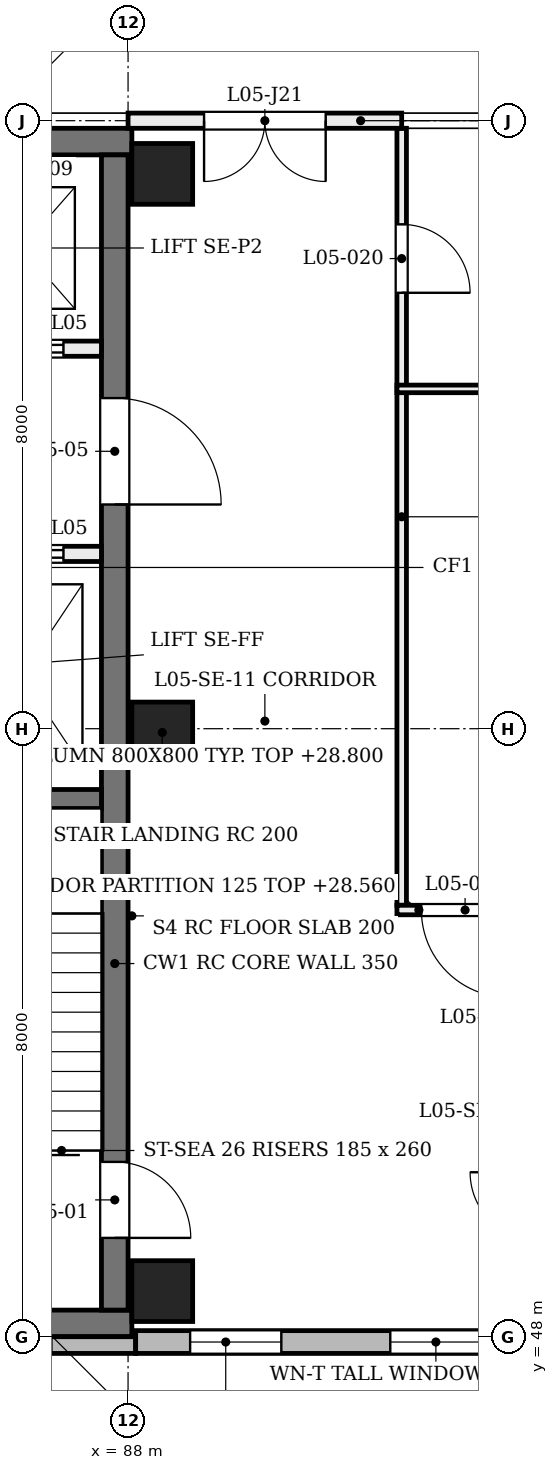
"""IFC4 building model, lengths in metres.
Left out: names, types, materials, properties, quantities, classifications, styles, units other than length and angle.
Written with IfcOpenShell. Run it as: python <this file> out.ifc"""

import sys

from ifc_helpers import new_model, si_unit, direction, frame, frame_2d, origin, origin_2d, place, context, subcontext, project, spatial, rectangle, extrude, element, fill, save


model = new_model("IFC4")
c1 = context("Model", 3, precision=1e-05, world=origin(), true_north=direction((0.0, 1.0)))
c2 = subcontext(c1, "Body", "Model", "MODEL_VIEW")
j1 = project(units=[si_unit("LENGTHUNIT", "METRE"), si_unit("PLANEANGLEUNIT", "RADIAN")], contexts=[c1])
p1 = place(None, origin())
s1 = spatial("IfcSite", under=j1, at=p1, CompositionType="ELEMENT")
p2 = place(p1, origin())
s2 = spatial("IfcBuilding", under=s1, at=p2, CompositionType="ELEMENT")
p3 = place(p2, frame((0.0, 0.0, 24.0)))
s3 = spatial("IfcBuildingStorey", under=s2, at=p3, CompositionType="ELEMENT", Elevation=24.0)
for number, where, z_axis, x_axis in (
    (1, (80.1, 48.175, 0.0), (0.0, 0.0, 1.0), (1.0, 0.0, 0.0)),
    (2, (80.1, 63.725, 0.0), (0.0, 0.0, 1.0), (1.0, 0.0, 0.0)),
):
    element("IfcWall", number, at=place(p3, frame(where, z_axis=z_axis, x_axis=x_axis)), inside=s3, PredefinedType="SHEAR", context=c2, shape_type="SweptSolid", body=[
        extrude(rectangle(XDim=7.95, YDim=0.35, at=frame_2d((3.975, 0.0))), origin(), (0.0, 0.0, 1.0), 4.58),
    ])
p4 = place(p3, frame((87.825, 48.35, 0.0), z_axis=(0.0, 0.0, 1.0), x_axis=(0.0, 1.0, 0.0)))
e3 = element("IfcWall", 3, at=p4, inside=s3, PredefinedType="SHEAR", context=c2, shape_type="SweptSolid", body=[
    extrude(rectangle(XDim=15.2, YDim=0.35, at=frame_2d((7.6, 0.0))), origin(), (0.0, 0.0, 1.0), 4.58),
])
p5 = place(p4, frame((0.95, 0.0, 0.0)))
e4 = element("IfcOpeningElement", 4, at=p5, cuts=e3, PredefinedType="OPENING", context=c2, shape_type="SweptSolid", body=[
    extrude(rectangle(XDim=1.0, YDim=2.1, at=frame_2d((0.5, 1.05))), frame((0.0, 0.185, 0.0), z_axis=(0.0, -1.0, 0.0), x_axis=(1.0, 0.0, 0.0)), (0.0, 0.0, 1.0), 0.37),
])
p6 = place(p4, frame((10.6, 0.0, 0.0)))
e5 = element("IfcOpeningElement", 5, at=p6, cuts=e3, PredefinedType="OPENING", context=c2, shape_type="SweptSolid", body=[
    extrude(rectangle(XDim=1.4, YDim=2.1, at=frame_2d((0.7, 1.05))), frame((0.0, 0.185, 0.0), z_axis=(0.0, -1.0, 0.0), x_axis=(1.0, 0.0, 0.0)), (0.0, 0.0, 1.0), 0.37),
])
for number, where, z_axis, x_axis in (
    (6, (88.45, 48.6, 0.0), (0.0, 0.0, 1.0), (1.0, 0.0, 0.0)),
    (7, (88.45, 55.95, 0.0), (0.0, 0.0, 1.0), (1.0, 0.0, 0.0)),
    (8, (88.45, 63.3, 0.0), (0.0, 0.0, 1.0), (1.0, 0.0, 0.0)),
):
    element("IfcColumn", number, at=place(p3, frame(where, z_axis=z_axis, x_axis=x_axis)), inside=s3, PredefinedType="COLUMN", context=c2, shape_type="SweptSolid", body=[
        extrude(rectangle(XDim=0.8, YDim=0.8, at=origin_2d()), origin(), (0.0, 0.0, 1.0), 4.8),
    ])
p7 = place(p3, frame((79.9, 47.89, 0.0), z_axis=(0.0, 0.0, 1.0), x_axis=(1.0, 0.0, 0.0)))
e9 = element("IfcWall", 9, at=p7, inside=s3, PredefinedType="SOLIDWALL", context=c2, shape_type="SweptSolid", body=[
    extrude(rectangle(XDim=8.2, YDim=0.22, at=frame_2d((4.1, 0.0))), origin(), (0.0, 0.0, 1.0), 3.9),
])
p8 = place(p7, frame((1.308, 0.0, 0.9)))
e10 = element("IfcOpeningElement", 10, at=p8, cuts=e9, PredefinedType="OPENING", context=c2, shape_type="SweptSolid", body=[
    extrude(rectangle(XDim=0.45, YDim=2.6, at=frame_2d((0.225, 1.3))), frame((0.0, 0.12, 0.0), z_axis=(0.0, -1.0, 0.0), x_axis=(1.0, 0.0, 0.0)), (0.0, 0.0, 1.0), 0.24),
])
p9 = place(p7, frame((3.975, 0.0, 0.9)))
e11 = element("IfcOpeningElement", 11, at=p9, cuts=e9, PredefinedType="OPENING", context=c2, shape_type="SweptSolid", body=[
    extrude(rectangle(XDim=0.45, YDim=2.6, at=frame_2d((0.225, 1.3))), frame((0.0, 0.12, 0.0), z_axis=(0.0, -1.0, 0.0), x_axis=(1.0, 0.0, 0.0)), (0.0, 0.0, 1.0), 0.24),
])
p10 = place(p7, frame((6.642, 0.0, 0.9)))
e12 = element("IfcOpeningElement", 12, at=p10, cuts=e9, PredefinedType="OPENING", context=c2, shape_type="SweptSolid", body=[
    extrude(rectangle(XDim=0.45, YDim=2.6, at=frame_2d((0.225, 1.3))), frame((0.0, 0.12, 0.0), z_axis=(0.0, -1.0, 0.0), x_axis=(1.0, 0.0, 0.0)), (0.0, 0.0, 1.0), 0.24),
])
p11 = place(p3, frame((88.1, 47.93, 0.0), z_axis=(0.0, 0.0, 1.0), x_axis=(1.0, 0.0, 0.0)))
e13 = element("IfcWall", 13, at=p11, inside=s3, PredefinedType="SOLIDWALL", context=c2, shape_type="SweptSolid", body=[
    extrude(rectangle(XDim=7.9, YDim=0.3, at=frame_2d((3.95, 0.0))), origin(), (0.0, 0.0, 1.0), 3.9),
])
p12 = place(p11, frame((0.717, 0.0, 0.75)))
e14 = element("IfcOpeningElement", 14, at=p12, cuts=e13, PredefinedType="OPENING", context=c2, shape_type="SweptSolid", body=[
    extrude(rectangle(XDim=1.2, YDim=3.1, at=frame_2d((0.6, 1.55))), frame((0.0, 0.16, 0.0), z_axis=(0.0, -1.0, 0.0), x_axis=(1.0, 0.0, 0.0)), (0.0, 0.0, 1.0), 0.32),
])
p13 = place(p11, frame((3.35, 0.0, 0.75)))
e15 = element("IfcOpeningElement", 15, at=p13, cuts=e13, PredefinedType="OPENING", context=c2, shape_type="SweptSolid", body=[
    extrude(rectangle(XDim=1.2, YDim=3.1, at=frame_2d((0.6, 1.55))), frame((0.0, 0.16, 0.0), z_axis=(0.0, -1.0, 0.0), x_axis=(1.0, 0.0, 0.0)), (0.0, 0.0, 1.0), 0.32),
])
p14 = place(p11, frame((5.983, 0.0, 0.75)))
e16 = element("IfcOpeningElement", 16, at=p14, cuts=e13, PredefinedType="OPENING", context=c2, shape_type="SweptSolid", body=[
    extrude(rectangle(XDim=1.2, YDim=3.1, at=frame_2d((0.6, 1.55))), frame((0.0, 0.16, 0.0), z_axis=(0.0, -1.0, 0.0), x_axis=(1.0, 0.0, 0.0)), (0.0, 0.0, 1.0), 0.32),
])
p15 = place(p3, frame((87.65, 55.075, 0.0), z_axis=(0.0, 0.0, 1.0), x_axis=(-1.0, 0.0, 0.0)))
e17 = element("IfcWall", 17, at=p15, inside=s3, PredefinedType="SOLIDWALL", context=c2, shape_type="SweptSolid", body=[
    extrude(rectangle(XDim=3.1, YDim=0.25, at=frame_2d((1.55, 0.0))), origin(), (0.0, 0.0, 1.0), 4.55),
])
p16 = place(p3, frame((87.65, 58.3, 0.0), z_axis=(0.0, 0.0, 1.0), x_axis=(-1.0, 0.0, 0.0)))
e18 = element("IfcWall", 18, at=p16, inside=s3, PredefinedType="SOLIDWALL", context=c2, shape_type="SweptSolid", body=[
    extrude(rectangle(XDim=7.2, YDim=0.2, at=frame_2d((3.6, 0.0))), origin(), (0.0, 0.0, 1.0), 4.55),
])
p17 = place(p16, frame((0.5, 0.0, 0.0)))
e19 = element("IfcOpeningElement", 19, at=p17, cuts=e18, PredefinedType="OPENING", context=c2, shape_type="SweptSolid", body=[
    extrude(rectangle(XDim=1.1, YDim=2.1, at=frame_2d((0.55, 1.05))), frame((0.0, 0.11, 0.0), z_axis=(0.0, -1.0, 0.0), x_axis=(1.0, 0.0, 0.0)), (0.0, 0.0, 1.0), 0.22),
])
p18 = place(p16, frame((5.6, 0.0, 0.0)))
e20 = element("IfcOpeningElement", 20, at=p18, cuts=e18, PredefinedType="OPENING", context=c2, shape_type="SweptSolid", body=[
    extrude(rectangle(XDim=1.1, YDim=2.1, at=frame_2d((0.55, 1.05))), frame((0.0, 0.11, 0.0), z_axis=(0.0, -1.0, 0.0), x_axis=(1.0, 0.0, 0.0)), (0.0, 0.0, 1.0), 0.22),
])
p19 = place(p16, frame((3.1, 0.0, 0.0)))
e21 = element("IfcOpeningElement", 21, at=p19, cuts=e18, PredefinedType="OPENING", context=c2, shape_type="SweptSolid", body=[
    extrude(rectangle(XDim=1.0, YDim=2.1, at=frame_2d((0.5, 1.05))), frame((0.0, 0.11, 0.0), z_axis=(0.0, -1.0, 0.0), x_axis=(1.0, 0.0, 0.0)), (0.0, 0.0, 1.0), 0.22),
])
p20 = place(p3, frame((87.65, 61.0, 0.0), z_axis=(0.0, 0.0, 1.0), x_axis=(-1.0, 0.0, 0.0)))
e22 = element("IfcWall", 22, at=p20, inside=s3, PredefinedType="SOLIDWALL", context=c2, shape_type="SweptSolid", body=[
    extrude(rectangle(XDim=7.2, YDim=0.2, at=frame_2d((3.6, 0.0))), origin(), (0.0, 0.0, 1.0), 4.55),
])
p21 = place(p20, frame((0.5, 0.0, 0.0)))
e23 = element("IfcOpeningElement", 23, at=p21, cuts=e22, PredefinedType="OPENING", context=c2, shape_type="SweptSolid", body=[
    extrude(rectangle(XDim=1.1, YDim=2.1, at=frame_2d((0.55, 1.05))), frame((0.0, 0.11, 0.0), z_axis=(0.0, -1.0, 0.0), x_axis=(1.0, 0.0, 0.0)), (0.0, 0.0, 1.0), 0.22),
])
p22 = place(p20, frame((5.6, 0.0, 0.0)))
e24 = element("IfcOpeningElement", 24, at=p22, cuts=e22, PredefinedType="OPENING", context=c2, shape_type="SweptSolid", body=[
    extrude(rectangle(XDim=1.1, YDim=2.1, at=frame_2d((0.55, 1.05))), frame((0.0, 0.11, 0.0), z_axis=(0.0, -1.0, 0.0), x_axis=(1.0, 0.0, 0.0)), (0.0, 0.0, 1.0), 0.22),
])
p23 = place(p20, frame((3.1, 0.0, 0.0)))
e25 = element("IfcOpeningElement", 25, at=p23, cuts=e22, PredefinedType="OPENING", context=c2, shape_type="SweptSolid", body=[
    extrude(rectangle(XDim=1.0, YDim=2.1, at=frame_2d((0.5, 1.05))), frame((0.0, 0.11, 0.0), z_axis=(0.0, -1.0, 0.0), x_axis=(1.0, 0.0, 0.0)), (0.0, 0.0, 1.0), 0.22),
])
p24 = place(p3, frame((91.6, 53.677, 0.0), z_axis=(0.0, 0.0, 1.0), x_axis=(0.0, 1.0, 0.0)))
e26 = element("IfcWall", 26, at=p24, inside=s3, PredefinedType="PARTITIONING", context=c2, shape_type="SweptSolid", body=[
    extrude(rectangle(XDim=10.223, YDim=0.125, at=frame_2d((5.112, 0.0))), origin(), (0.0, 0.0, 1.0), 3.88),
])
p25 = place(p24, frame((8.059, 0.0, 0.0)))
e27 = element("IfcOpeningElement", 27, at=p25, cuts=e26, PredefinedType="OPENING", context=c2, shape_type="SweptSolid", body=[
    extrude(rectangle(XDim=0.9, YDim=2.1, at=frame_2d((0.45, 1.05))), frame((0.0, 0.073, 0.0), z_axis=(0.0, -1.0, 0.0), x_axis=(1.0, 0.0, 0.0)), (0.0, 0.0, 1.0), 0.145),
])
p26 = place(p3, frame((91.538, 53.614, 0.0), z_axis=(0.0, 0.0, 1.0), x_axis=(1.0, 0.0, 0.0)))
e28 = element("IfcWall", 28, at=p26, inside=s3, PredefinedType="PARTITIONING", context=c2, shape_type="SweptSolid", body=[
    extrude(rectangle(XDim=1.925, YDim=0.125, at=frame_2d((0.962, 0.0))), origin(), (0.0, 0.0, 1.0), 4.56),
])
p27 = place(p26, frame((0.322, 0.0, 0.0)))
e29 = element("IfcOpeningElement", 29, at=p27, cuts=e28, PredefinedType="OPENING", context=c2, shape_type="SweptSolid", body=[
    extrude(rectangle(XDim=1.15, YDim=2.1, at=frame_2d((0.575, 1.05))), frame((0.0, 0.073, 0.0), z_axis=(0.0, -1.0, 0.0), x_axis=(1.0, 0.0, 0.0)), (0.0, 0.0, 1.0), 0.145),
])
p28 = place(p3, frame((91.538, 60.471, 0.0), z_axis=(0.0, 0.0, 1.0), x_axis=(1.0, 0.0, 0.0)))
e30 = element("IfcWall", 30, at=p28, inside=s3, PredefinedType="PARTITIONING", context=c2, shape_type="SweptSolid", body=[
    extrude(rectangle(XDim=4.382, YDim=0.1, at=frame_2d((2.191, 0.0))), origin(), (0.0, 0.0, 1.0), 3.88),
])
p29 = place(p3, frame((88.0, 64.0, 0.0), z_axis=(0.0, 0.0, 1.0), x_axis=(1.0, 0.0, 0.0)))
e31 = element("IfcWall", 31, at=p29, inside=s3, PredefinedType="PARTITIONING", context=c2, shape_type="SweptSolid", body=[
    extrude(rectangle(XDim=3.6, YDim=0.2, at=frame_2d((1.8, 0.0))), origin(), (0.0, 0.0, 1.0), 3.88),
])
p30 = place(p29, frame((1.0, 0.0, 0.0)))
e32 = element("IfcOpeningElement", 32, at=p30, cuts=e31, PredefinedType="OPENING", context=c2, shape_type="SweptSolid", body=[
    extrude(rectangle(XDim=1.6, YDim=2.1, at=frame_2d((0.8, 1.05))), frame((0.0, 0.11, 0.0), z_axis=(0.0, -1.0, 0.0), x_axis=(1.0, 0.0, 0.0)), (0.0, 0.0, 1.0), 0.22),
])
p31 = place(p12, origin())
e33 = element("IfcWindow", 33, at=p31, inside=s3, PartitioningType="SINGLE_PANEL", PredefinedType="WINDOW", context=c2, shape_type="SweptSolid", body=[
    extrude(rectangle(XDim=1.2, YDim=3.1, at=frame_2d((0.6, 1.55))), frame((0.0, 0.03, 0.0), z_axis=(0.0, -1.0, 0.0), x_axis=(1.0, 0.0, 0.0)), (0.0, 0.0, 1.0), 0.06),
])
fill(e14, e33)
p32 = place(p13, origin())
e34 = element("IfcWindow", 34, at=p32, inside=s3, PartitioningType="SINGLE_PANEL", PredefinedType="WINDOW", context=c2, shape_type="SweptSolid", body=[
    extrude(rectangle(XDim=1.2, YDim=3.1, at=frame_2d((0.6, 1.55))), frame((0.0, 0.03, 0.0), z_axis=(0.0, -1.0, 0.0), x_axis=(1.0, 0.0, 0.0)), (0.0, 0.0, 1.0), 0.06),
])
fill(e15, e34)
p33 = place(p5, frame((1.0, 0.0, 0.0), z_axis=(0.0, 0.0, 1.0), x_axis=(-1.0, 0.0, 0.0)))
e35 = element("IfcDoor", 35, at=p33, inside=s3, OperationType="SINGLE_SWING_LEFT", PredefinedType="DOOR", context=c2, shape_type="SweptSolid", body=[
    extrude(rectangle(XDim=1.0, YDim=2.1, at=frame_2d((0.5, 1.05))), frame((0.0, 0.025, 0.0), z_axis=(0.0, -1.0, 0.0), x_axis=(1.0, 0.0, 0.0)), (0.0, 0.0, 1.0), 0.05),
])
fill(e4, e35)
p34 = place(p17, frame((1.1, 0.0, 0.0), z_axis=(0.0, 0.0, 1.0), x_axis=(-1.0, 0.0, 0.0)))
e36 = element("IfcDoor", 36, at=p34, inside=s3, OperationType="DOUBLE_DOOR_SLIDING", PredefinedType="DOOR", context=c2, shape_type="SweptSolid", body=[
    extrude(rectangle(XDim=1.1, YDim=2.1, at=frame_2d((0.55, 1.05))), frame((0.0, 0.025, 0.0), z_axis=(0.0, -1.0, 0.0), x_axis=(1.0, 0.0, 0.0)), (0.0, 0.0, 1.0), 0.05),
])
fill(e19, e36)
p35 = place(p21, origin())
e37 = element("IfcDoor", 37, at=p35, inside=s3, OperationType="DOUBLE_DOOR_SLIDING", PredefinedType="DOOR", context=c2, shape_type="SweptSolid", body=[
    extrude(rectangle(XDim=1.1, YDim=2.1, at=frame_2d((0.55, 1.05))), frame((0.0, 0.025, 0.0), z_axis=(0.0, -1.0, 0.0), x_axis=(1.0, 0.0, 0.0)), (0.0, 0.0, 1.0), 0.05),
])
fill(e23, e37)
p36 = place(p6, frame((1.4, 0.0, 0.0), z_axis=(0.0, 0.0, 1.0), x_axis=(-1.0, 0.0, 0.0)))
e38 = element("IfcDoor", 38, at=p36, inside=s3, OperationType="SINGLE_SWING_LEFT", PredefinedType="DOOR", context=c2, shape_type="SweptSolid", body=[
    extrude(rectangle(XDim=1.4, YDim=2.1, at=frame_2d((0.7, 1.05))), frame((0.0, 0.025, 0.0), z_axis=(0.0, -1.0, 0.0), x_axis=(1.0, 0.0, 0.0)), (0.0, 0.0, 1.0), 0.05),
])
fill(e5, e38)
p37 = place(p27, origin())
e39 = element("IfcDoor", 39, at=p37, inside=s3, OperationType="SINGLE_SWING_RIGHT", PredefinedType="DOOR", context=c2, shape_type="SweptSolid", body=[
    extrude(rectangle(XDim=1.15, YDim=2.1, at=frame_2d((0.575, 1.05))), frame((0.0, 0.025, 0.0), z_axis=(0.0, -1.0, 0.0), x_axis=(1.0, 0.0, 0.0)), (0.0, 0.0, 1.0), 0.05),
])
fill(e29, e39)
p38 = place(p25, frame((0.9, 0.0, 0.0), z_axis=(0.0, 0.0, 1.0), x_axis=(-1.0, 0.0, 0.0)))
e40 = element("IfcDoor", 40, at=p38, inside=s3, OperationType="SINGLE_SWING_LEFT", PredefinedType="DOOR", context=c2, shape_type="SweptSolid", body=[
    extrude(rectangle(XDim=0.9, YDim=2.1, at=frame_2d((0.45, 1.05))), frame((0.0, 0.025, 0.0), z_axis=(0.0, -1.0, 0.0), x_axis=(1.0, 0.0, 0.0)), (0.0, 0.0, 1.0), 0.05),
])
fill(e27, e40)
p39 = place(p30, frame((1.6, 0.0, 0.0), z_axis=(0.0, 0.0, 1.0), x_axis=(-1.0, 0.0, 0.0)))
e41 = element("IfcDoor", 41, at=p39, inside=s3, OperationType="DOUBLE_DOOR_SINGLE_SWING", PredefinedType="DOOR", context=c2, shape_type="SweptSolid", body=[
    extrude(rectangle(XDim=1.6, YDim=2.1, at=frame_2d((0.8, 1.05))), frame((0.0, 0.025, 0.0), z_axis=(0.0, -1.0, 0.0), x_axis=(1.0, 0.0, 0.0)), (0.0, 0.0, 1.0), 0.05),
])
fill(e32, e41)
save(model, sys.argv[1])
